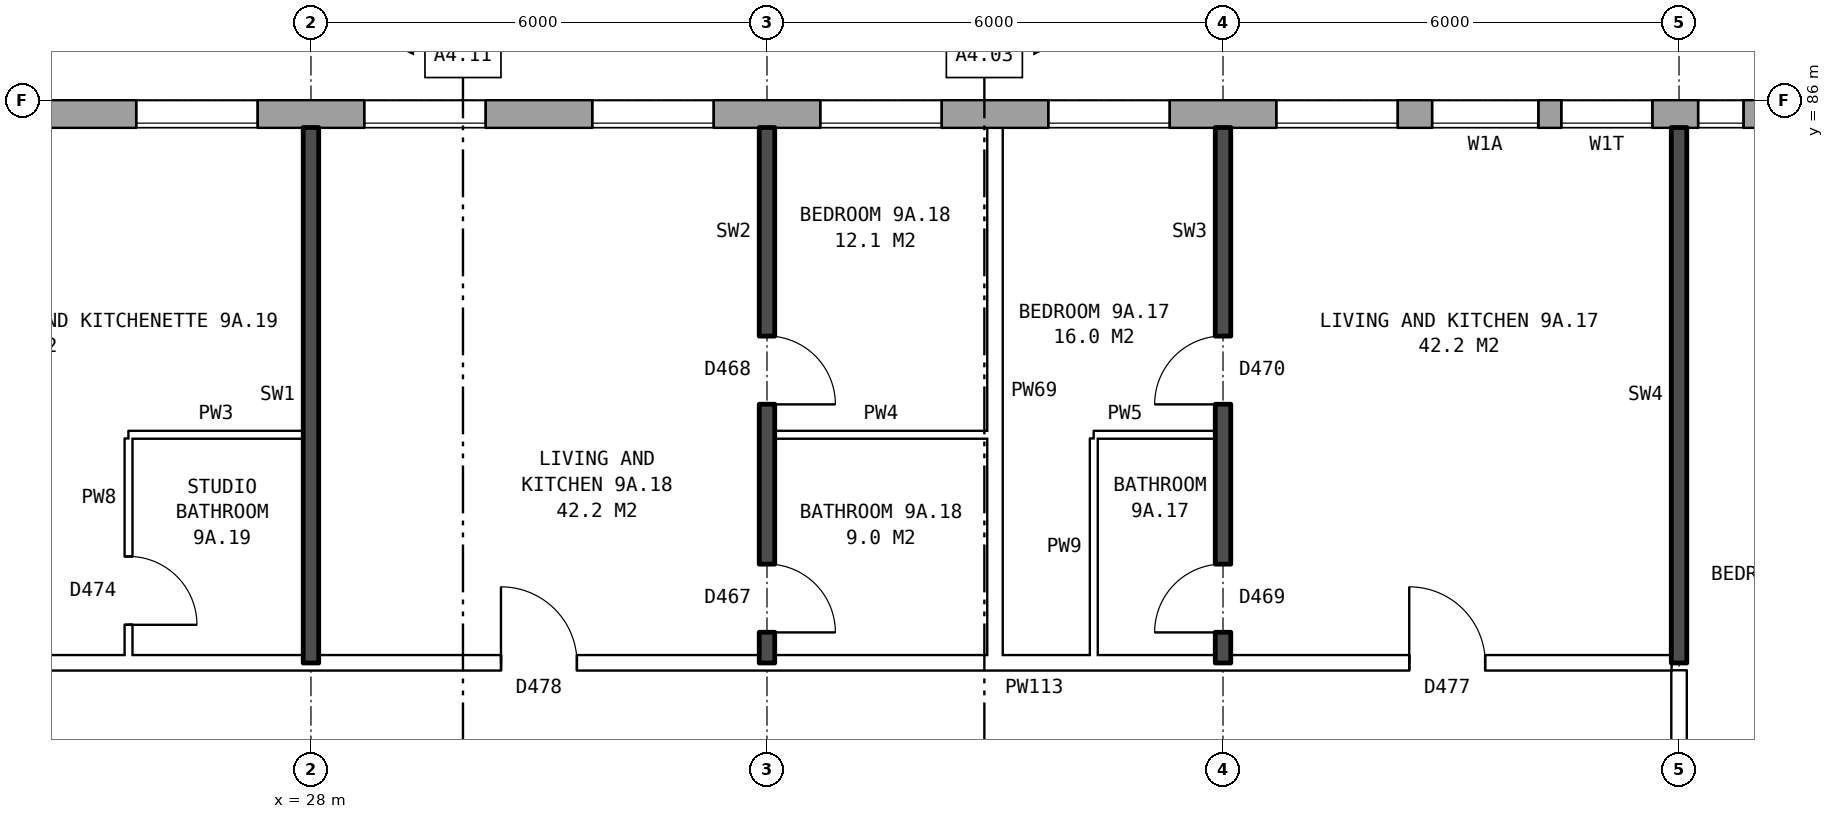
"""IFC4 building model, lengths in metres.
Left out: names, types, materials, properties, quantities, classifications, styles, units other than length and angle.
Written with IfcOpenShell. Run it as: python <this file> out.ifc"""

import sys

from ifc_helpers import new_model, si_unit, direction, frame, frame_2d, origin, place, context, subcontext, project, spatial, rectangle, extrude, element, fill, save


model = new_model("IFC4")
c1 = context("Model", 3, precision=1e-05, world=origin(), true_north=direction((0.0, 1.0)))
c2 = subcontext(c1, "Body", "Model", "MODEL_VIEW")
j1 = project(units=[si_unit("LENGTHUNIT", "METRE"), si_unit("PLANEANGLEUNIT", "RADIAN")], contexts=[c1])
p1 = place(None, origin())
s1 = spatial("IfcSite", under=j1, at=p1, CompositionType="ELEMENT")
p2 = place(p1, origin())
s2 = spatial("IfcBuilding", under=s1, at=p2, CompositionType="ELEMENT")
p3 = place(p2, frame((0.0, 0.0, 35.0)))
s3 = spatial("IfcBuildingStorey", under=s2, at=p3, CompositionType="ELEMENT", Elevation=35.0)
p4 = place(p3, frame((72.925, 85.82, 0.0), z_axis=(0.0, 0.0, 1.0), x_axis=(-1.0, 0.0, 0.0)))
e1 = element("IfcWall", 1, at=p4, inside=s3, PredefinedType="STANDARD", context=c2, shape_type="SweptSolid", body=[
    extrude(rectangle(XDim=50.101, YDim=0.36, at=frame_2d((25.05, 0.0))), origin(), (0.0, 0.0, 1.0), 2.85),
])
p5 = place(p4, frame((0.625, 0.0, 0.8)))
e2 = element("IfcOpeningElement", 2, at=p5, cuts=e1, PredefinedType="OPENING", context=c2, shape_type="SweptSolid", body=[
    extrude(rectangle(XDim=1.6, YDim=1.8, at=frame_2d((0.8, 0.9))), frame((0.0, 0.19, 0.0), z_axis=(0.0, -1.0, 0.0), x_axis=(1.0, 0.0, 0.0)), (0.0, 0.0, 1.0), 0.38),
])
p6 = place(p4, frame((3.625, 0.0, 0.8)))
e3 = element("IfcOpeningElement", 3, at=p6, cuts=e1, PredefinedType="OPENING", context=c2, shape_type="SweptSolid", body=[
    extrude(rectangle(XDim=1.6, YDim=1.8, at=frame_2d((0.8, 0.9))), frame((0.0, 0.19, 0.0), z_axis=(0.0, -1.0, 0.0), x_axis=(1.0, 0.0, 0.0)), (0.0, 0.0, 1.0), 0.38),
])
p7 = place(p4, frame((6.625, 0.0, 0.8)))
e4 = element("IfcOpeningElement", 4, at=p7, cuts=e1, PredefinedType="OPENING", context=c2, shape_type="SweptSolid", body=[
    extrude(rectangle(XDim=1.6, YDim=1.8, at=frame_2d((0.8, 0.9))), frame((0.0, 0.19, 0.0), z_axis=(0.0, -1.0, 0.0), x_axis=(1.0, 0.0, 0.0)), (0.0, 0.0, 1.0), 0.38),
])
p8 = place(p4, frame((9.625, 0.0, 0.8)))
e5 = element("IfcOpeningElement", 5, at=p8, cuts=e1, PredefinedType="OPENING", context=c2, shape_type="SweptSolid", body=[
    extrude(rectangle(XDim=1.6, YDim=1.8, at=frame_2d((0.8, 0.9))), frame((0.0, 0.19, 0.0), z_axis=(0.0, -1.0, 0.0), x_axis=(1.0, 0.0, 0.0)), (0.0, 0.0, 1.0), 0.38),
])
p9 = place(p4, frame((12.625, 0.0, 0.8)))
e6 = element("IfcOpeningElement", 6, at=p9, cuts=e1, PredefinedType="OPENING", context=c2, shape_type="SweptSolid", body=[
    extrude(rectangle(XDim=1.6, YDim=1.8, at=frame_2d((0.8, 0.9))), frame((0.0, 0.19, 0.0), z_axis=(0.0, -1.0, 0.0), x_axis=(1.0, 0.0, 0.0)), (0.0, 0.0, 1.0), 0.38),
])
p10 = place(p4, frame((15.625, 0.0, 0.8)))
e7 = element("IfcOpeningElement", 7, at=p10, cuts=e1, PredefinedType="OPENING", context=c2, shape_type="SweptSolid", body=[
    extrude(rectangle(XDim=1.6, YDim=1.8, at=frame_2d((0.8, 0.9))), frame((0.0, 0.19, 0.0), z_axis=(0.0, -1.0, 0.0), x_axis=(1.0, 0.0, 0.0)), (0.0, 0.0, 1.0), 0.38),
])
p11 = place(p4, frame((18.625, 0.0, 0.8)))
e8 = element("IfcOpeningElement", 8, at=p11, cuts=e1, PredefinedType="OPENING", context=c2, shape_type="SweptSolid", body=[
    extrude(rectangle(XDim=1.6, YDim=1.8, at=frame_2d((0.8, 0.9))), frame((0.0, 0.19, 0.0), z_axis=(0.0, -1.0, 0.0), x_axis=(1.0, 0.0, 0.0)), (0.0, 0.0, 1.0), 0.38),
])
p12 = place(p4, frame((21.125, 0.0, 1.1)))
e9 = element("IfcOpeningElement", 9, at=p12, cuts=e1, PredefinedType="OPENING", context=c2, shape_type="SweptSolid", body=[
    extrude(rectangle(XDim=0.8, YDim=1.5, at=frame_2d((0.4, 0.75))), frame((0.0, 0.19, 0.0), z_axis=(0.0, -1.0, 0.0), x_axis=(1.0, 0.0, 0.0)), (0.0, 0.0, 1.0), 0.38),
])
p13 = place(p4, frame((24.175, 0.0, 0.15)))
e10 = element("IfcOpeningElement", 10, at=p13, cuts=e1, PredefinedType="OPENING", context=c2, shape_type="SweptSolid", body=[
    extrude(rectangle(XDim=1.6, YDim=1.5, at=frame_2d((0.8, 0.75))), frame((0.0, 0.19, 0.0), z_axis=(0.0, -1.0, 0.0), x_axis=(1.0, 0.0, 0.0)), (0.0, 0.0, 1.0), 0.38),
])
p14 = place(p4, frame((27.275, 0.0, 1.7)))
e11 = element("IfcOpeningElement", 11, at=p14, cuts=e1, PredefinedType="OPENING", context=c2, shape_type="SweptSolid", body=[
    extrude(rectangle(XDim=1.2, YDim=0.9, at=frame_2d((0.6, 0.45))), frame((0.0, 0.19, 0.0), z_axis=(0.0, -1.0, 0.0), x_axis=(1.0, 0.0, 0.0)), (0.0, 0.0, 1.0), 0.38),
])
p15 = place(p4, frame((30.625, 0.0, 0.8)))
e12 = element("IfcOpeningElement", 12, at=p15, cuts=e1, PredefinedType="OPENING", context=c2, shape_type="SweptSolid", body=[
    extrude(rectangle(XDim=1.6, YDim=1.8, at=frame_2d((0.8, 0.9))), frame((0.0, 0.19, 0.0), z_axis=(0.0, -1.0, 0.0), x_axis=(1.0, 0.0, 0.0)), (0.0, 0.0, 1.0), 0.38),
])
p16 = place(p4, frame((33.625, 0.0, 0.8)))
e13 = element("IfcOpeningElement", 13, at=p16, cuts=e1, PredefinedType="OPENING", context=c2, shape_type="SweptSolid", body=[
    extrude(rectangle(XDim=1.6, YDim=1.8, at=frame_2d((0.8, 0.9))), frame((0.0, 0.19, 0.0), z_axis=(0.0, -1.0, 0.0), x_axis=(1.0, 0.0, 0.0)), (0.0, 0.0, 1.0), 0.38),
])
p17 = place(p4, frame((36.625, 0.0, 0.8)))
e14 = element("IfcOpeningElement", 14, at=p17, cuts=e1, PredefinedType="OPENING", context=c2, shape_type="SweptSolid", body=[
    extrude(rectangle(XDim=1.6, YDim=1.8, at=frame_2d((0.8, 0.9))), frame((0.0, 0.19, 0.0), z_axis=(0.0, -1.0, 0.0), x_axis=(1.0, 0.0, 0.0)), (0.0, 0.0, 1.0), 0.38),
])
p18 = place(p4, frame((39.625, 0.0, 0.8)))
e15 = element("IfcOpeningElement", 15, at=p18, cuts=e1, PredefinedType="OPENING", context=c2, shape_type="SweptSolid", body=[
    extrude(rectangle(XDim=1.6, YDim=1.8, at=frame_2d((0.8, 0.9))), frame((0.0, 0.19, 0.0), z_axis=(0.0, -1.0, 0.0), x_axis=(1.0, 0.0, 0.0)), (0.0, 0.0, 1.0), 0.38),
])
p19 = place(p4, frame((42.625, 0.0, 0.8)))
e16 = element("IfcOpeningElement", 16, at=p19, cuts=e1, PredefinedType="OPENING", context=c2, shape_type="SweptSolid", body=[
    extrude(rectangle(XDim=1.6, YDim=1.8, at=frame_2d((0.8, 0.9))), frame((0.0, 0.19, 0.0), z_axis=(0.0, -1.0, 0.0), x_axis=(1.0, 0.0, 0.0)), (0.0, 0.0, 1.0), 0.38),
])
p20 = place(p4, frame((45.625, 0.0, 0.8)))
e17 = element("IfcOpeningElement", 17, at=p20, cuts=e1, PredefinedType="OPENING", context=c2, shape_type="SweptSolid", body=[
    extrude(rectangle(XDim=1.6, YDim=1.8, at=frame_2d((0.8, 0.9))), frame((0.0, 0.19, 0.0), z_axis=(0.0, -1.0, 0.0), x_axis=(1.0, 0.0, 0.0)), (0.0, 0.0, 1.0), 0.38),
])
p21 = place(p4, frame((22.225, 0.0, 1.7)))
e18 = element("IfcOpeningElement", 18, at=p21, cuts=e1, PredefinedType="OPENING", context=c2, shape_type="SweptSolid", body=[
    extrude(rectangle(XDim=0.6, YDim=0.9, at=frame_2d((0.3, 0.45))), frame((0.0, 0.19, 0.0), z_axis=(0.0, -1.0, 0.0), x_axis=(1.0, 0.0, 0.0)), (0.0, 0.0, 1.0), 0.38),
])
p22 = place(p4, frame((26.075, 0.0, 0.25)))
e19 = element("IfcOpeningElement", 19, at=p22, cuts=e1, PredefinedType="OPENING", context=c2, shape_type="SweptSolid", body=[
    extrude(rectangle(XDim=0.6, YDim=0.9, at=frame_2d((0.3, 0.45))), frame((0.0, 0.19, 0.0), z_axis=(0.0, -1.0, 0.0), x_axis=(1.0, 0.0, 0.0)), (0.0, 0.0, 1.0), 0.38),
])
p23 = place(p4, frame((28.775, 0.0, 0.8)))
e20 = element("IfcOpeningElement", 20, at=p23, cuts=e1, PredefinedType="OPENING", context=c2, shape_type="SweptSolid", body=[
    extrude(rectangle(XDim=1.4, YDim=1.8, at=frame_2d((0.7, 0.9))), frame((0.0, 0.19, 0.0), z_axis=(0.0, -1.0, 0.0), x_axis=(1.0, 0.0, 0.0)), (0.0, 0.0, 1.0), 0.38),
])
p24 = place(p3, frame((20.11, 78.6, 0.0), z_axis=(0.0, 0.0, 1.0), x_axis=(1.0, 0.0, 0.0)))
e21 = element("IfcWall", 21, at=p24, inside=s3, PredefinedType="PARTITIONING", context=c2, shape_type="SweptSolid", body=[
    extrude(rectangle(XDim=25.79, YDim=0.2, at=frame_2d((12.895, 0.0))), origin(), (0.0, 0.0, 1.0), 2.85),
])
p25 = place(p24, frame((22.34, 0.0, 0.0)))
e22 = element("IfcOpeningElement", 22, at=p25, cuts=e21, PredefinedType="OPENING", context=c2, shape_type="SweptSolid", body=[
    extrude(rectangle(XDim=1.0, YDim=2.1, at=frame_2d((0.5, 1.05))), frame((0.0, 0.11, 0.0), z_axis=(0.0, -1.0, 0.0), x_axis=(1.0, 0.0, 0.0)), (0.0, 0.0, 1.0), 0.22),
])
p26 = place(p24, frame((10.39, 0.0, 0.0)))
e23 = element("IfcOpeningElement", 23, at=p26, cuts=e21, PredefinedType="OPENING", context=c2, shape_type="SweptSolid", body=[
    extrude(rectangle(XDim=1.0, YDim=2.1, at=frame_2d((0.5, 1.05))), frame((0.0, 0.11, 0.0), z_axis=(0.0, -1.0, 0.0), x_axis=(1.0, 0.0, 0.0)), (0.0, 0.0, 1.0), 0.22),
])
p27 = place(p24, frame((2.245, 0.0, 0.0)))
e24 = element("IfcOpeningElement", 24, at=p27, cuts=e21, PredefinedType="OPENING", context=c2, shape_type="SweptSolid", body=[
    extrude(rectangle(XDim=1.0, YDim=2.1, at=frame_2d((0.5, 1.05))), frame((0.0, 0.11, 0.0), z_axis=(0.0, -1.0, 0.0), x_axis=(1.0, 0.0, 0.0)), (0.0, 0.0, 1.0), 0.22),
])
p28 = place(p3, frame((25.6, 81.6, 0.0), z_axis=(0.0, 0.0, 1.0), x_axis=(1.0, 0.0, 0.0)))
e25 = element("IfcWall", 25, at=p28, inside=s3, PredefinedType="PARTITIONING", context=c2, shape_type="SweptSolid", body=[
    extrude(rectangle(XDim=2.3, YDim=0.1, at=frame_2d((1.15, 0.0))), origin(), (0.0, 0.0, 1.0), 2.85),
])
p29 = place(p3, frame((34.1, 81.6, 0.0), z_axis=(0.0, 0.0, 1.0), x_axis=(1.0, 0.0, 0.0)))
e26 = element("IfcWall", 26, at=p29, inside=s3, PredefinedType="PARTITIONING", context=c2, shape_type="SweptSolid", body=[
    extrude(rectangle(XDim=2.8, YDim=0.1, at=frame_2d((1.4, 0.0))), origin(), (0.0, 0.0, 1.0), 2.85),
])
p30 = place(p3, frame((38.3, 81.6, 0.0), z_axis=(0.0, 0.0, 1.0), x_axis=(1.0, 0.0, 0.0)))
e27 = element("IfcWall", 27, at=p30, inside=s3, PredefinedType="PARTITIONING", context=c2, shape_type="SweptSolid", body=[
    extrude(rectangle(XDim=1.6, YDim=0.1, at=frame_2d((0.8, 0.0))), origin(), (0.0, 0.0, 1.0), 2.85),
])
p31 = place(p3, frame((25.6, 78.7, 0.0), z_axis=(0.0, 0.0, 1.0), x_axis=(0.0, 1.0, 0.0)))
e28 = element("IfcWall", 28, at=p31, inside=s3, PredefinedType="PARTITIONING", context=c2, shape_type="SweptSolid", body=[
    extrude(rectangle(XDim=2.85, YDim=0.1, at=frame_2d((1.425, 0.0))), origin(), (0.0, 0.0, 1.0), 2.85),
])
p32 = place(p31, frame((0.4, 0.0, 0.0)))
e29 = element("IfcOpeningElement", 29, at=p32, cuts=e28, PredefinedType="OPENING", context=c2, shape_type="SweptSolid", body=[
    extrude(rectangle(XDim=0.9, YDim=2.1, at=frame_2d((0.45, 1.05))), frame((0.0, 0.06, 0.0), z_axis=(0.0, -1.0, 0.0), x_axis=(1.0, 0.0, 0.0)), (0.0, 0.0, 1.0), 0.12),
])
p33 = place(p3, frame((28.0, 78.6, 0.0), z_axis=(0.0, 0.0, 1.0), x_axis=(0.0, 1.0, 0.0)))
e30 = element("IfcWall", 30, at=p33, inside=s3, PredefinedType="SOLIDWALL", context=c2, shape_type="SweptSolid", body=[
    extrude(rectangle(XDim=7.04, YDim=0.2, at=frame_2d((3.52, 0.0))), origin(), (0.0, 0.0, 1.0), 2.85),
])
p34 = place(p3, frame((34.0, 78.6, 0.0), z_axis=(0.0, 0.0, 1.0), x_axis=(0.0, 1.0, 0.0)))
e31 = element("IfcWall", 31, at=p34, inside=s3, PredefinedType="SOLIDWALL", context=c2, shape_type="SweptSolid", body=[
    extrude(rectangle(XDim=7.04, YDim=0.2, at=frame_2d((3.52, 0.0))), origin(), (0.0, 0.0, 1.0), 2.85),
])
p35 = place(p34, frame((3.4, 0.0, 0.0)))
e32 = element("IfcOpeningElement", 32, at=p35, cuts=e31, PredefinedType="OPENING", context=c2, shape_type="SweptSolid", body=[
    extrude(rectangle(XDim=0.9, YDim=2.1, at=frame_2d((0.45, 1.05))), frame((0.0, 0.11, 0.0), z_axis=(0.0, -1.0, 0.0), x_axis=(1.0, 0.0, 0.0)), (0.0, 0.0, 1.0), 0.22),
])
p36 = place(p34, frame((0.4, 0.0, 0.0)))
e33 = element("IfcOpeningElement", 33, at=p36, cuts=e31, PredefinedType="OPENING", context=c2, shape_type="SweptSolid", body=[
    extrude(rectangle(XDim=0.9, YDim=2.1, at=frame_2d((0.45, 1.05))), frame((0.0, 0.11, 0.0), z_axis=(0.0, -1.0, 0.0), x_axis=(1.0, 0.0, 0.0)), (0.0, 0.0, 1.0), 0.22),
])
p37 = place(p3, frame((37.0, 78.7, 0.0), z_axis=(0.0, 0.0, 1.0), x_axis=(0.0, 1.0, 0.0)))
e34 = element("IfcWall", 34, at=p37, inside=s3, PredefinedType="PARTITIONING", context=c2, shape_type="SweptSolid", body=[
    extrude(rectangle(XDim=6.94, YDim=0.2, at=frame_2d((3.47, 0.0))), origin(), (0.0, 0.0, 1.0), 2.85),
])
p38 = place(p3, frame((38.3, 78.7, 0.0), z_axis=(0.0, 0.0, 1.0), x_axis=(0.0, 1.0, 0.0)))
e35 = element("IfcWall", 35, at=p38, inside=s3, PredefinedType="PARTITIONING", context=c2, shape_type="SweptSolid", body=[
    extrude(rectangle(XDim=2.85, YDim=0.1, at=frame_2d((1.425, 0.0))), origin(), (0.0, 0.0, 1.0), 2.85),
])
p39 = place(p3, frame((40.0, 78.6, 0.0), z_axis=(0.0, 0.0, 1.0), x_axis=(0.0, 1.0, 0.0)))
e36 = element("IfcWall", 36, at=p39, inside=s3, PredefinedType="SOLIDWALL", context=c2, shape_type="SweptSolid", body=[
    extrude(rectangle(XDim=7.04, YDim=0.2, at=frame_2d((3.52, 0.0))), origin(), (0.0, 0.0, 1.0), 2.85),
])
p40 = place(p39, frame((3.4, 0.0, 0.0)))
e37 = element("IfcOpeningElement", 37, at=p40, cuts=e36, PredefinedType="OPENING", context=c2, shape_type="SweptSolid", body=[
    extrude(rectangle(XDim=0.9, YDim=2.1, at=frame_2d((0.45, 1.05))), frame((0.0, 0.11, 0.0), z_axis=(0.0, -1.0, 0.0), x_axis=(1.0, 0.0, 0.0)), (0.0, 0.0, 1.0), 0.22),
])
p41 = place(p39, frame((0.4, 0.0, 0.0)))
e38 = element("IfcOpeningElement", 38, at=p41, cuts=e36, PredefinedType="OPENING", context=c2, shape_type="SweptSolid", body=[
    extrude(rectangle(XDim=0.9, YDim=2.1, at=frame_2d((0.45, 1.05))), frame((0.0, 0.11, 0.0), z_axis=(0.0, -1.0, 0.0), x_axis=(1.0, 0.0, 0.0)), (0.0, 0.0, 1.0), 0.22),
])
p42 = place(p3, frame((46.0, 76.3, 0.0), z_axis=(0.0, 0.0, 1.0), x_axis=(0.0, 1.0, 0.0)))
e39 = element("IfcWall", 39, at=p42, inside=s3, PredefinedType="PARTITIONING", context=c2, shape_type="SweptSolid", body=[
    extrude(rectangle(XDim=2.2, YDim=0.2, at=frame_2d((1.1, 0.0))), origin(), (0.0, 0.0, 1.0), 2.85),
])
p43 = place(p3, frame((46.0, 78.6, 0.0), z_axis=(0.0, 0.0, 1.0), x_axis=(0.0, 1.0, 0.0)))
e40 = element("IfcWall", 40, at=p43, inside=s3, PredefinedType="SOLIDWALL", context=c2, shape_type="SweptSolid", body=[
    extrude(rectangle(XDim=7.04, YDim=0.2, at=frame_2d((3.52, 0.0))), origin(), (0.0, 0.0, 1.0), 2.85),
])
p44 = place(p14, origin())
e41 = element("IfcWindow", 41, at=p44, inside=s3, PartitioningType="SINGLE_PANEL", PredefinedType="WINDOW", context=c2, shape_type="SweptSolid", body=[
    extrude(rectangle(XDim=1.2, YDim=0.9, at=frame_2d((0.6, 0.45))), frame((0.0, 0.15, 0.0), z_axis=(0.0, -1.0, 0.0), x_axis=(1.0, 0.0, 0.0)), (0.0, 0.0, 1.0), 0.06),
])
fill(e11, e41)
p45 = place(p15, origin())
e42 = element("IfcWindow", 42, at=p45, inside=s3, PartitioningType="SINGLE_PANEL", PredefinedType="WINDOW", context=c2, shape_type="SweptSolid", body=[
    extrude(rectangle(XDim=1.6, YDim=1.8, at=frame_2d((0.8, 0.9))), frame((0.0, 0.15, 0.0), z_axis=(0.0, -1.0, 0.0), x_axis=(1.0, 0.0, 0.0)), (0.0, 0.0, 1.0), 0.06),
])
fill(e12, e42)
p46 = place(p16, origin())
e43 = element("IfcWindow", 43, at=p46, inside=s3, PartitioningType="SINGLE_PANEL", PredefinedType="WINDOW", context=c2, shape_type="SweptSolid", body=[
    extrude(rectangle(XDim=1.6, YDim=1.8, at=frame_2d((0.8, 0.9))), frame((0.0, 0.15, 0.0), z_axis=(0.0, -1.0, 0.0), x_axis=(1.0, 0.0, 0.0)), (0.0, 0.0, 1.0), 0.06),
])
fill(e13, e43)
p47 = place(p17, origin())
e44 = element("IfcWindow", 44, at=p47, inside=s3, PartitioningType="SINGLE_PANEL", PredefinedType="WINDOW", context=c2, shape_type="SweptSolid", body=[
    extrude(rectangle(XDim=1.6, YDim=1.8, at=frame_2d((0.8, 0.9))), frame((0.0, 0.15, 0.0), z_axis=(0.0, -1.0, 0.0), x_axis=(1.0, 0.0, 0.0)), (0.0, 0.0, 1.0), 0.06),
])
fill(e14, e44)
p48 = place(p18, origin())
e45 = element("IfcWindow", 45, at=p48, inside=s3, PartitioningType="SINGLE_PANEL", PredefinedType="WINDOW", context=c2, shape_type="SweptSolid", body=[
    extrude(rectangle(XDim=1.6, YDim=1.8, at=frame_2d((0.8, 0.9))), frame((0.0, 0.15, 0.0), z_axis=(0.0, -1.0, 0.0), x_axis=(1.0, 0.0, 0.0)), (0.0, 0.0, 1.0), 0.06),
])
fill(e15, e45)
p49 = place(p19, origin())
e46 = element("IfcWindow", 46, at=p49, inside=s3, PartitioningType="SINGLE_PANEL", PredefinedType="WINDOW", context=c2, shape_type="SweptSolid", body=[
    extrude(rectangle(XDim=1.6, YDim=1.8, at=frame_2d((0.8, 0.9))), frame((0.0, 0.15, 0.0), z_axis=(0.0, -1.0, 0.0), x_axis=(1.0, 0.0, 0.0)), (0.0, 0.0, 1.0), 0.06),
])
fill(e16, e46)
p50 = place(p20, origin())
e47 = element("IfcWindow", 47, at=p50, inside=s3, PartitioningType="SINGLE_PANEL", PredefinedType="WINDOW", context=c2, shape_type="SweptSolid", body=[
    extrude(rectangle(XDim=1.6, YDim=1.8, at=frame_2d((0.8, 0.9))), frame((0.0, 0.15, 0.0), z_axis=(0.0, -1.0, 0.0), x_axis=(1.0, 0.0, 0.0)), (0.0, 0.0, 1.0), 0.06),
])
fill(e17, e47)
p51 = place(p40, origin())
e48 = element("IfcDoor", 48, at=p51, inside=s3, OperationType="SINGLE_SWING_LEFT", PredefinedType="DOOR", context=c2, shape_type="SweptSolid", body=[
    extrude(rectangle(XDim=0.9, YDim=2.1, at=frame_2d((0.45, 1.05))), frame((0.0, 0.025, 0.0), z_axis=(0.0, -1.0, 0.0), x_axis=(1.0, 0.0, 0.0)), (0.0, 0.0, 1.0), 0.05),
])
fill(e37, e48)
p52 = place(p25, origin())
e49 = element("IfcDoor", 49, at=p52, inside=s3, OperationType="SINGLE_SWING_LEFT", PredefinedType="DOOR", context=c2, shape_type="SweptSolid", body=[
    extrude(rectangle(XDim=1.0, YDim=2.1, at=frame_2d((0.5, 1.05))), frame((0.0, 0.025, 0.0), z_axis=(0.0, -1.0, 0.0), x_axis=(1.0, 0.0, 0.0)), (0.0, 0.0, 1.0), 0.05),
])
fill(e22, e49)
p53 = place(p41, origin())
e50 = element("IfcDoor", 50, at=p53, inside=s3, OperationType="SINGLE_SWING_LEFT", PredefinedType="DOOR", context=c2, shape_type="SweptSolid", body=[
    extrude(rectangle(XDim=0.9, YDim=2.1, at=frame_2d((0.45, 1.05))), frame((0.0, 0.025, 0.0), z_axis=(0.0, -1.0, 0.0), x_axis=(1.0, 0.0, 0.0)), (0.0, 0.0, 1.0), 0.05),
])
fill(e38, e50)
p54 = place(p35, frame((0.9, 0.0, 0.0), z_axis=(0.0, 0.0, 1.0), x_axis=(-1.0, 0.0, 0.0)))
e51 = element("IfcDoor", 51, at=p54, inside=s3, OperationType="SINGLE_SWING_RIGHT", PredefinedType="DOOR", context=c2, shape_type="SweptSolid", body=[
    extrude(rectangle(XDim=0.9, YDim=2.1, at=frame_2d((0.45, 1.05))), frame((0.0, 0.025, 0.0), z_axis=(0.0, -1.0, 0.0), x_axis=(1.0, 0.0, 0.0)), (0.0, 0.0, 1.0), 0.05),
])
fill(e32, e51)
p55 = place(p26, origin())
e52 = element("IfcDoor", 52, at=p55, inside=s3, OperationType="SINGLE_SWING_LEFT", PredefinedType="DOOR", context=c2, shape_type="SweptSolid", body=[
    extrude(rectangle(XDim=1.0, YDim=2.1, at=frame_2d((0.5, 1.05))), frame((0.0, 0.025, 0.0), z_axis=(0.0, -1.0, 0.0), x_axis=(1.0, 0.0, 0.0)), (0.0, 0.0, 1.0), 0.05),
])
fill(e23, e52)
p56 = place(p36, frame((0.9, 0.0, 0.0), z_axis=(0.0, 0.0, 1.0), x_axis=(-1.0, 0.0, 0.0)))
e53 = element("IfcDoor", 53, at=p56, inside=s3, OperationType="SINGLE_SWING_RIGHT", PredefinedType="DOOR", context=c2, shape_type="SweptSolid", body=[
    extrude(rectangle(XDim=0.9, YDim=2.1, at=frame_2d((0.45, 1.05))), frame((0.0, 0.025, 0.0), z_axis=(0.0, -1.0, 0.0), x_axis=(1.0, 0.0, 0.0)), (0.0, 0.0, 1.0), 0.05),
])
fill(e33, e53)
p57 = place(p32, frame((0.9, 0.0, 0.0), z_axis=(0.0, 0.0, 1.0), x_axis=(-1.0, 0.0, 0.0)))
e54 = element("IfcDoor", 54, at=p57, inside=s3, OperationType="SINGLE_SWING_RIGHT", PredefinedType="DOOR", context=c2, shape_type="SweptSolid", body=[
    extrude(rectangle(XDim=0.9, YDim=2.1, at=frame_2d((0.45, 1.05))), frame((0.0, 0.025, 0.0), z_axis=(0.0, -1.0, 0.0), x_axis=(1.0, 0.0, 0.0)), (0.0, 0.0, 1.0), 0.05),
])
fill(e29, e54)
p58 = place(p22, origin())
e55 = element("IfcWindow", 55, at=p58, inside=s3, PartitioningType="SINGLE_PANEL", PredefinedType="WINDOW", context=c2, shape_type="SweptSolid", body=[
    extrude(rectangle(XDim=0.6, YDim=0.9, at=frame_2d((0.3, 0.45))), frame((0.0, 0.15, 0.0), z_axis=(0.0, -1.0, 0.0), x_axis=(1.0, 0.0, 0.0)), (0.0, 0.0, 1.0), 0.06),
])
fill(e19, e55)
p59 = place(p23, origin())
e56 = element("IfcWindow", 56, at=p59, inside=s3, PartitioningType="SINGLE_PANEL", PredefinedType="WINDOW", context=c2, shape_type="SweptSolid", body=[
    extrude(rectangle(XDim=1.4, YDim=1.8, at=frame_2d((0.7, 0.9))), frame((0.0, 0.15, 0.0), z_axis=(0.0, -1.0, 0.0), x_axis=(1.0, 0.0, 0.0)), (0.0, 0.0, 1.0), 0.06),
])
fill(e20, e56)
save(model, sys.argv[1])
